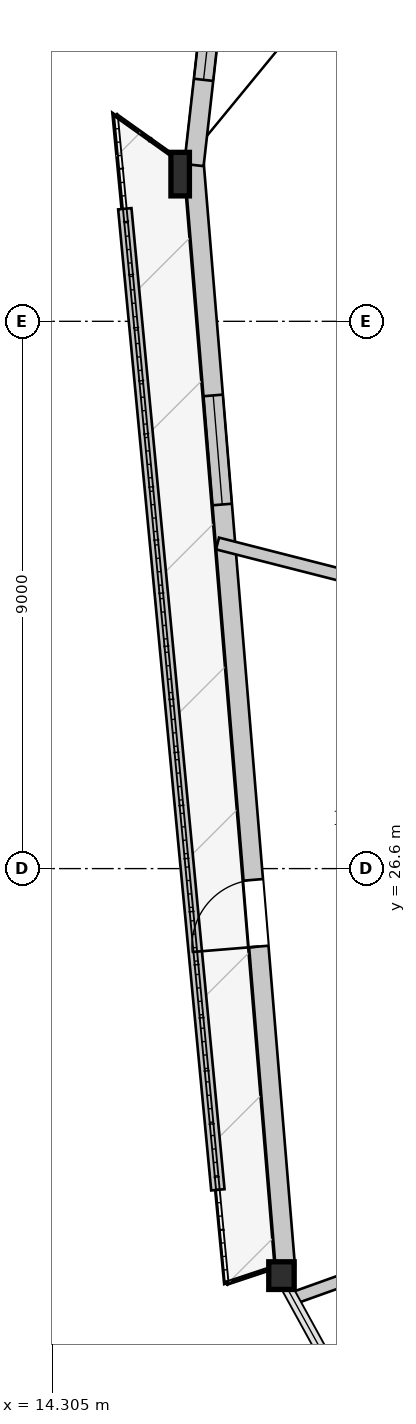
"""IFC4 building model, lengths in metres.
Left out: names, types, materials, properties, quantities, classifications, styles, units other than length and angle.
Written with IfcOpenShell. Run it as: python <this file> out.ifc"""

import sys

from ifc_helpers import new_model, si_unit, direction, frame, frame_2d, origin, origin_2d, place, context, subcontext, project, spatial, rectangle, i_section, extrude, source, transform, mapped, element, fill, save


model = new_model("IFC4")
c1 = context("Model", 3, precision=1e-05, world=origin(), true_north=direction((0.0, 1.0)))
c2 = subcontext(c1, "Body", "Model", "MODEL_VIEW")
j1 = project(units=[si_unit("LENGTHUNIT", "METRE"), si_unit("PLANEANGLEUNIT", "RADIAN")], contexts=[c1])
p1 = place(None, origin())
s1 = spatial("IfcSite", under=j1, at=p1, CompositionType="ELEMENT")
p2 = place(p1, origin())
s2 = spatial("IfcBuilding", under=s1, at=p2, CompositionType="ELEMENT")
p3 = place(p2, frame((0.0, 0.0, 109.25)))
s3 = spatial("IfcBuildingStorey", under=s2, at=p3, CompositionType="ELEMENT", Elevation=109.25)
m1 = source(origin(), c2, "Body", "SweptSolid", [
    extrude(i_section(OverallWidth=0.304, OverallDepth=0.716, WebThickness=0.021, FlangeThickness=0.04, at=origin_2d()), origin(), (0.0, 0.0, 1.0), 3.404),
])
p4 = place(p3, frame((16.479, 38.188, 0.0), z_axis=(-0.039659803431, -0.098324756788, 0.994363787652), x_axis=(0.927399841512, -0.374071562623, 0.0)))
e1 = element("IfcColumn", 1, at=p4, inside=s3, PredefinedType="COLUMN", context=c2, shape_type="MappedRepresentation", body=[
    mapped(m1, transform((0.0, 0.0, 0.0), x_axis=(1.0, 0.0, 0.0), y_axis=(0.0, 1.0, 0.0), z_axis=(0.0, 0.0, 1.0), scale=1.0)),
])
m2 = source(origin(), c2, "Body", "SweptSolid", [
    extrude(i_section(OverallWidth=0.418, OverallDepth=0.455, WebThickness=0.038, FlangeThickness=0.059, at=origin_2d()), origin(), (0.0, 0.0, 1.0), 3.403),
])
p5 = place(p3, frame((17.98, 20.048, 0.0), z_axis=(0.057259482904, -0.083449597264, 0.994865577017), x_axis=(0.824558750738, 0.565776339715, 0.0)))
e2 = element("IfcColumn", 2, at=p5, inside=s3, PredefinedType="COLUMN", context=c2, shape_type="MappedRepresentation", body=[
    mapped(m2, transform((0.0, 0.0, 0.0), x_axis=(1.0, 0.0, 0.0), y_axis=(0.0, 1.0, 0.0), z_axis=(0.0, 0.0, 1.0), scale=1.0)),
])
p6 = place(p3, frame((18.139, 20.062, 0.0), z_axis=(0.0, 0.0, 1.0), x_axis=(-0.082462696948, 0.996594151905, 0.0)))
e3 = element("IfcWall", 3, at=p6, inside=s3, PredefinedType="SOLIDWALL", context=c2, shape_type="SweptSolid", body=[
    extrude(rectangle(XDim=18.202, YDim=0.32, at=frame_2d((9.101, 0.0))), origin(), (0.0, 0.0, 1.0), 2.692),
])
p7 = place(p6, frame((5.275, 0.0, 0.0)))
e4 = element("IfcOpeningElement", 4, at=p7, cuts=e3, PredefinedType="OPENING", context=c2, shape_type="SweptSolid", body=[
    extrude(rectangle(XDim=1.1, YDim=2.3, at=frame_2d((0.55, 1.15))), frame((0.0, 0.17, 0.0), z_axis=(0.0, -1.0, 0.0), x_axis=(1.0, 0.0, 0.0)), (0.0, 0.0, 1.0), 0.34),
])
p8 = place(p6, frame((12.569, 0.0, 0.372)))
e5 = element("IfcOpeningElement", 5, at=p8, cuts=e3, PredefinedType="OPENING", context=c2, shape_type="SweptSolid", body=[
    extrude(rectangle(XDim=1.8, YDim=2.2, at=frame_2d((0.9, 1.1))), frame((0.0, 0.17, 0.0), z_axis=(0.0, -1.0, 0.0), x_axis=(1.0, 0.0, 0.0)), (0.0, 0.0, 1.0), 0.34),
])
p9 = place(p3, frame((16.638, 38.17, 0.0), z_axis=(0.0, 0.0, 1.0), x_axis=(0.112143625954, 0.993692008199, 0.0)))
e6 = element("IfcWall", 6, at=p9, inside=s3, PredefinedType="SOLIDWALL", context=c2, shape_type="SweptSolid", body=[
    extrude(rectangle(XDim=4.319, YDim=0.32, at=frame_2d((2.16, 0.0))), origin(), (0.0, 0.0, 1.0), 2.692),
])
p10 = place(p9, frame((1.41, 0.0, 0.272)))
e7 = element("IfcOpeningElement", 7, at=p10, cuts=e6, PredefinedType="OPENING", context=c2, shape_type="SweptSolid", body=[
    extrude(rectangle(XDim=1.5, YDim=2.3, at=frame_2d((0.75, 1.15))), frame((0.0, 0.17, 0.0), z_axis=(0.0, -1.0, 0.0), x_axis=(1.0, 0.0, 0.0)), (0.0, 0.0, 1.0), 0.34),
])
p11 = place(p3, frame((15.501, 37.451, 0.0), z_axis=(0.0, 0.0, 1.0), x_axis=(0.094440121339, -0.995530543721, 0.0)))
e8 = element("IfcWall", 8, at=p11, inside=s3, PredefinedType="PARAPET", context=c2, shape_type="SweptSolid", body=[
    extrude(rectangle(XDim=16.206, YDim=0.22, at=frame_2d((8.103, 0.0))), origin(), (0.0, 0.0, 1.0), 0.3),
])
p12 = place(p3, frame((27.45, 22.823, 0.0), z_axis=(0.0, 0.0, 1.0), x_axis=(-0.941467347451, -0.337104188174, 0.0)))
e9 = element("IfcWall", 9, at=p12, inside=s3, PredefinedType="PARTITIONING", context=c2, shape_type="SweptSolid", body=[
    extrude(rectangle(XDim=9.728, YDim=0.2, at=frame_2d((4.864, 0.0))), origin(), (0.0, 0.0, 1.0), 2.785),
])
p13 = place(p3, frame((27.45, 29.289, 0.0), z_axis=(0.0, 0.0, 1.0), x_axis=(-0.96902028645, 0.246981141887, 0.0)))
e10 = element("IfcWall", 10, at=p13, inside=s3, PredefinedType="PARTITIONING", context=c2, shape_type="SweptSolid", body=[
    extrude(rectangle(XDim=10.758, YDim=0.2, at=frame_2d((5.379, 0.0))), origin(), (0.0, 0.0, 1.0), 3.3),
])
m3 = source(origin(), c2, "Body", "SweptSolid", [
    extrude(rectangle(XDim=1.1, YDim=2.3, at=frame_2d((0.55, 1.15))), frame((0.0, 0.025, 0.0), z_axis=(0.0, -1.0, 0.0), x_axis=(1.0, 0.0, 0.0)), (0.0, 0.0, 1.0), 0.05),
])
p14 = place(p7, origin())
e11 = element("IfcDoor", 11, at=p14, inside=s3, OperationType="SINGLE_SWING_LEFT", PredefinedType="DOOR", context=c2, shape_type="MappedRepresentation", body=[
    mapped(m3, transform((0.0, 0.0, 0.0), x_axis=(1.0, 0.0, 0.0), y_axis=(0.0, 1.0, 0.0), z_axis=(0.0, 0.0, 1.0), scale=1.0)),
])
fill(e4, e11)
m4 = source(origin(), c2, "Body", "SweptSolid", [
    extrude(rectangle(XDim=1.8, YDim=2.2, at=frame_2d((0.9, 1.1))), frame((0.0, 0.03, 0.0), z_axis=(0.0, -1.0, 0.0), x_axis=(1.0, 0.0, 0.0)), (0.0, 0.0, 1.0), 0.06),
])
p15 = place(p8, origin())
e12 = element("IfcWindow", 12, at=p15, inside=s3, PartitioningType="SINGLE_PANEL", PredefinedType="WINDOW", context=c2, shape_type="MappedRepresentation", body=[
    mapped(m4, transform((0.0, 0.0, 0.0), x_axis=(1.0, 0.0, 0.0), y_axis=(0.0, 1.0, 0.0), z_axis=(0.0, 0.0, 1.0), scale=1.0)),
])
fill(e5, e12)
m5 = source(origin(), c2, "Body", "SweptSolid", [
    extrude(rectangle(XDim=1.5, YDim=2.3, at=frame_2d((0.75, 1.15))), frame((0.0, 0.03, 0.0), z_axis=(0.0, -1.0, 0.0), x_axis=(1.0, 0.0, 0.0)), (0.0, 0.0, 1.0), 0.06),
])
p16 = place(p10, origin())
e13 = element("IfcWindow", 13, at=p16, inside=s3, PartitioningType="SINGLE_PANEL", PredefinedType="WINDOW", context=c2, shape_type="MappedRepresentation", body=[
    mapped(m5, transform((0.0, 0.0, 0.0), x_axis=(1.0, 0.0, 0.0), y_axis=(0.0, 1.0, 0.0), z_axis=(0.0, 0.0, 1.0), scale=1.0)),
])
fill(e7, e13)
save(model, sys.argv[1])
